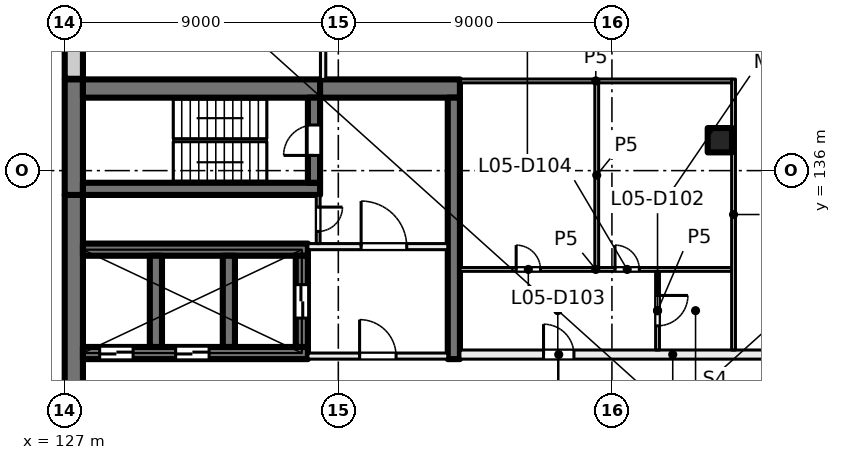
"""IFC4 building model, lengths in metres.
Left out: names, types, materials, properties, quantities, classifications, styles, units other than length and angle.
Written with IfcOpenShell. Run it as: python <this file> out.ifc"""

import sys

from ifc_helpers import new_model, si_unit, direction, frame, frame_2d, origin, origin_2d, place, context, subcontext, project, spatial, rectangle, extrude, element, fill, save


model = new_model("IFC4")
c1 = context("Model", 3, precision=1e-05, world=origin(), true_north=direction((0.0, 1.0)))
c2 = subcontext(c1, "Body", "Model", "MODEL_VIEW")
j1 = project(units=[si_unit("LENGTHUNIT", "METRE"), si_unit("PLANEANGLEUNIT", "RADIAN")], contexts=[c1])
p1 = place(None, origin())
s1 = spatial("IfcSite", under=j1, at=p1, CompositionType="ELEMENT")
p2 = place(p1, origin())
s2 = spatial("IfcBuilding", under=s1, at=p2, CompositionType="ELEMENT")
p3 = place(p2, frame((0.0, 0.0, 27.5)))
s3 = spatial("IfcBuildingStorey", under=s2, at=p3, CompositionType="ELEMENT", Elevation=27.5)
p4 = place(p3, frame((148.55, 137.0, 0.0), z_axis=(0.0, 0.0, 1.0), x_axis=(1.0, 0.0, 0.0)))
e1 = element("IfcColumn", 1, at=p4, inside=s3, PredefinedType="COLUMN", context=c2, shape_type="SweptSolid", body=[
    extrude(rectangle(XDim=0.8, YDim=0.8, at=origin_2d()), origin(), (0.0, 0.0, 1.0), 4.0),
])
p5 = place(p3, frame((127.3, 120.8, 0.0), z_axis=(0.0, 0.0, 1.0), x_axis=(0.0, 1.0, 0.0)))
e2 = element("IfcWall", 2, at=p5, inside=s3, PredefinedType="SHEAR", context=c2, shape_type="SweptSolid", body=[
    extrude(rectangle(XDim=14.4, YDim=0.6, at=frame_2d((7.2, 0.0))), origin(), (0.0, 0.0, 1.0), 4.0),
])
p6 = place(p3, frame((127.3, 135.2, 0.0), z_axis=(0.0, 0.0, 1.0), x_axis=(0.0, 1.0, 0.0)))
e3 = element("IfcWall", 3, at=p6, inside=s3, PredefinedType="SHEAR", context=c2, shape_type="SweptSolid", body=[
    extrude(rectangle(XDim=3.8, YDim=0.6, at=frame_2d((1.9, 0.0))), origin(), (0.0, 0.0, 1.0), 4.0),
])
p7 = place(p3, frame((127.6, 138.7, 0.0), z_axis=(0.0, 0.0, 1.0), x_axis=(1.0, 0.0, 0.0)))
e4 = element("IfcWall", 4, at=p7, inside=s3, PredefinedType="SHEAR", context=c2, shape_type="SweptSolid", body=[
    extrude(rectangle(XDim=7.8, YDim=0.6, at=frame_2d((3.9, 0.0))), origin(), (0.0, 0.0, 1.0), 4.0),
])
p8 = place(p3, frame((135.4, 138.7, 0.0), z_axis=(0.0, 0.0, 1.0), x_axis=(1.0, 0.0, 0.0)))
e5 = element("IfcWall", 5, at=p8, inside=s3, PredefinedType="SHEAR", context=c2, shape_type="SweptSolid", body=[
    extrude(rectangle(XDim=4.6, YDim=0.6, at=frame_2d((2.3, 0.0))), origin(), (0.0, 0.0, 1.0), 4.0),
])
p9 = place(p3, frame((127.6, 135.4, 0.0), z_axis=(0.0, 0.0, 1.0), x_axis=(1.0, 0.0, 0.0)))
e6 = element("IfcWall", 6, at=p9, inside=s3, PredefinedType="SHEAR", context=c2, shape_type="SweptSolid", body=[
    extrude(rectangle(XDim=7.8, YDim=0.4, at=frame_2d((3.9, 0.0))), origin(), (0.0, 0.0, 1.0), 4.0),
])
p10 = place(p3, frame((135.2, 135.6, 0.0), z_axis=(0.0, 0.0, 1.0), x_axis=(0.0, 1.0, 0.0)))
e7 = element("IfcWall", 7, at=p10, inside=s3, PredefinedType="SHEAR", context=c2, shape_type="SweptSolid", body=[
    extrude(rectangle(XDim=2.8, YDim=0.4, at=frame_2d((1.4, 0.0))), origin(), (0.0, 0.0, 1.0), 4.0),
])
p11 = place(p10, frame((0.9, 0.0, 0.0)))
e8 = element("IfcOpeningElement", 8, at=p11, cuts=e7, PredefinedType="OPENING", context=c2, shape_type="SweptSolid", body=[
    extrude(rectangle(XDim=1.0, YDim=2.1, at=frame_2d((0.5, 1.05))), frame((0.0, 0.21, 0.0), z_axis=(0.0, -1.0, 0.0), x_axis=(1.0, 0.0, 0.0)), (0.0, 0.0, 1.0), 0.42),
])
p12 = place(p3, frame((127.6, 130.0, 0.0), z_axis=(0.0, 0.0, 1.0), x_axis=(1.0, 0.0, 0.0)))
e9 = element("IfcWall", 9, at=p12, inside=s3, PredefinedType="SHEAR", context=c2, shape_type="SweptSolid", body=[
    extrude(rectangle(XDim=7.4, YDim=0.4, at=frame_2d((3.7, 0.0))), origin(), (0.0, 0.0, 1.0), 4.0),
])
p13 = place(p12, frame((0.55, 0.0, 0.0)))
e10 = element("IfcOpeningElement", 10, at=p13, cuts=e9, PredefinedType="OPENING", context=c2, shape_type="SweptSolid", body=[
    extrude(rectangle(XDim=1.1, YDim=2.1, at=frame_2d((0.55, 1.05))), frame((0.0, 0.21, 0.0), z_axis=(0.0, -1.0, 0.0), x_axis=(1.0, 0.0, 0.0)), (0.0, 0.0, 1.0), 0.42),
])
p14 = place(p12, frame((3.05, 0.0, 0.0)))
e11 = element("IfcOpeningElement", 11, at=p14, cuts=e9, PredefinedType="OPENING", context=c2, shape_type="SweptSolid", body=[
    extrude(rectangle(XDim=1.1, YDim=2.1, at=frame_2d((0.55, 1.05))), frame((0.0, 0.21, 0.0), z_axis=(0.0, -1.0, 0.0), x_axis=(1.0, 0.0, 0.0)), (0.0, 0.0, 1.0), 0.42),
])
p15 = place(p3, frame((127.6, 133.4, 0.0), z_axis=(0.0, 0.0, 1.0), x_axis=(1.0, 0.0, 0.0)))
e12 = element("IfcWall", 12, at=p15, inside=s3, PredefinedType="SHEAR", context=c2, shape_type="SweptSolid", body=[
    extrude(rectangle(XDim=7.4, YDim=0.4, at=frame_2d((3.7, 0.0))), origin(), (0.0, 0.0, 1.0), 4.0),
])
for number, where, z_axis, x_axis in (
    (13, (130.0, 130.2, 0.0), (0.0, 0.0, 1.0), (0.0, 1.0, 0.0)),
    (14, (132.4, 130.2, 0.0), (0.0, 0.0, 1.0), (0.0, 1.0, 0.0)),
):
    element("IfcWall", number, at=place(p3, frame(where, z_axis=z_axis, x_axis=x_axis)), inside=s3, PredefinedType="SHEAR", context=c2, shape_type="SweptSolid", body=[
        extrude(rectangle(XDim=3.0, YDim=0.4, at=frame_2d((1.5, 0.0))), origin(), (0.0, 0.0, 1.0), 4.0),
    ])
p16 = place(p3, frame((134.8, 130.2, 0.0), z_axis=(0.0, 0.0, 1.0), x_axis=(0.0, 1.0, 0.0)))
e15 = element("IfcWall", 15, at=p16, inside=s3, PredefinedType="SHEAR", context=c2, shape_type="SweptSolid", body=[
    extrude(rectangle(XDim=3.0, YDim=0.4, at=frame_2d((1.5, 0.0))), origin(), (0.0, 0.0, 1.0), 4.0),
])
p17 = place(p16, frame((0.95, 0.0, 0.0)))
e16 = element("IfcOpeningElement", 16, at=p17, cuts=e15, PredefinedType="OPENING", context=c2, shape_type="SweptSolid", body=[
    extrude(rectangle(XDim=1.1, YDim=2.1, at=frame_2d((0.55, 1.05))), frame((0.0, 0.21, 0.0), z_axis=(0.0, -1.0, 0.0), x_axis=(1.0, 0.0, 0.0)), (0.0, 0.0, 1.0), 0.42),
])
p18 = place(p3, frame((139.8, 129.8, 0.0), z_axis=(0.0, 0.0, 1.0), x_axis=(0.0, 1.0, 0.0)))
e17 = element("IfcWall", 17, at=p18, inside=s3, PredefinedType="SHEAR", context=c2, shape_type="SweptSolid", body=[
    extrude(rectangle(XDim=8.6, YDim=0.4, at=frame_2d((4.3, 0.0))), origin(), (0.0, 0.0, 1.0), 4.0),
])
p19 = place(p3, frame((127.3, 139.02, 0.0), z_axis=(0.0, 0.0, 1.0), x_axis=(0.0, 1.0, 0.0)))
e18 = element("IfcWall", 18, at=p19, inside=s3, PredefinedType="SOLIDWALL", context=c2, shape_type="SweptSolid", body=[
    extrude(rectangle(XDim=2.98, YDim=0.6, at=frame_2d((1.49, 0.0))), origin(), (0.0, 0.0, 1.0), 3.625),
])
p20 = place(p3, frame((135.0, 129.9, 0.0), z_axis=(0.0, 0.0, 1.0), x_axis=(1.0, 0.0, 0.0)))
e19 = element("IfcWall", 19, at=p20, inside=s3, PredefinedType="PARTITIONING", context=c2, shape_type="SweptSolid", body=[
    extrude(rectangle(XDim=4.6, YDim=0.2, at=frame_2d((2.3, 0.0))), origin(), (0.0, 0.0, 1.0), 3.625),
])
p21 = place(p20, frame((1.7, 0.0, 0.0)))
e20 = element("IfcOpeningElement", 20, at=p21, cuts=e19, PredefinedType="OPENING", context=c2, shape_type="SweptSolid", body=[
    extrude(rectangle(XDim=1.2, YDim=2.1, at=frame_2d((0.6, 1.05))), frame((0.0, 0.11, 0.0), z_axis=(0.0, -1.0, 0.0), x_axis=(1.0, 0.0, 0.0)), (0.0, 0.0, 1.0), 0.22),
])
p22 = place(p3, frame((135.0, 133.5, 0.0), z_axis=(0.0, 0.0, 1.0), x_axis=(1.0, 0.0, 0.0)))
e21 = element("IfcWall", 21, at=p22, inside=s3, PredefinedType="PARTITIONING", context=c2, shape_type="SweptSolid", body=[
    extrude(rectangle(XDim=4.6, YDim=0.2, at=frame_2d((2.3, 0.0))), origin(), (0.0, 0.0, 1.0), 3.625),
])
p23 = place(p22, frame((1.75, 0.0, 0.0)))
e22 = element("IfcOpeningElement", 22, at=p23, cuts=e21, PredefinedType="OPENING", context=c2, shape_type="SweptSolid", body=[
    extrude(rectangle(XDim=1.5, YDim=2.1, at=frame_2d((0.75, 1.05))), frame((0.0, 0.11, 0.0), z_axis=(0.0, -1.0, 0.0), x_axis=(1.0, 0.0, 0.0)), (0.0, 0.0, 1.0), 0.22),
])
p24 = place(p3, frame((135.337, 135.2, 0.0), z_axis=(0.0, 0.0, 1.0), x_axis=(0.0, -1.0, 0.0)))
e23 = element("IfcWall", 23, at=p24, inside=s3, PredefinedType="PARTITIONING", context=c2, shape_type="SweptSolid", body=[
    extrude(rectangle(XDim=1.6, YDim=0.125, at=frame_2d((0.8, 0.0))), origin(), (0.0, 0.0, 1.0), 3.625),
])
p25 = place(p24, frame((0.4, 0.0, 0.0)))
e24 = element("IfcOpeningElement", 24, at=p25, cuts=e23, PredefinedType="OPENING", context=c2, shape_type="SweptSolid", body=[
    extrude(rectangle(XDim=0.8, YDim=2.1, at=frame_2d((0.4, 1.05))), frame((0.0, 0.073, 0.0), z_axis=(0.0, -1.0, 0.0), x_axis=(1.0, 0.0, 0.0)), (0.0, 0.0, 1.0), 0.145),
])
p26 = place(p3, frame((135.5, 145.4, 0.0), z_axis=(0.0, 0.0, 1.0), x_axis=(0.0, -1.0, 0.0)))
e25 = element("IfcWall", 25, at=p26, inside=s3, PredefinedType="PARTITIONING", context=c2, shape_type="SweptSolid", body=[
    extrude(rectangle(XDim=6.4, YDim=0.175, at=frame_2d((3.2, 0.0))), origin(), (0.0, 0.0, 1.0), 3.625),
])
p27 = place(p26, frame((2.6, 0.0, 0.0)))
e26 = element("IfcOpeningElement", 26, at=p27, cuts=e25, PredefinedType="OPENING", context=c2, shape_type="SweptSolid", body=[
    extrude(rectangle(XDim=1.2, YDim=2.1, at=frame_2d((0.6, 1.05))), frame((0.0, 0.097, 0.0), z_axis=(0.0, -1.0, 0.0), x_axis=(1.0, 0.0, 0.0)), (0.0, 0.0, 1.0), 0.195),
])
p28 = place(p3, frame((140.0, 129.95, 0.0), z_axis=(0.0, 0.0, 1.0), x_axis=(1.0, 0.0, 0.0)))
e27 = element("IfcWall", 27, at=p28, inside=s3, PredefinedType="PARTITIONING", context=c2, shape_type="SweptSolid", body=[
    extrude(rectangle(XDim=14.0, YDim=0.3, at=frame_2d((7.0, 0.0))), origin(), (0.0, 0.0, 1.0), 3.625),
])
p29 = place(p28, frame((2.75, 0.0, 0.0)))
e28 = element("IfcOpeningElement", 28, at=p29, cuts=e27, PredefinedType="OPENING", context=c2, shape_type="SweptSolid", body=[
    extrude(rectangle(XDim=1.0, YDim=2.1, at=frame_2d((0.5, 1.05))), frame((0.0, 0.16, 0.0), z_axis=(0.0, -1.0, 0.0), x_axis=(1.0, 0.0, 0.0)), (0.0, 0.0, 1.0), 0.32),
])
p30 = place(p28, frame((10.6, 0.0, 0.0)))
e29 = element("IfcOpeningElement", 29, at=p30, cuts=e27, PredefinedType="OPENING", context=c2, shape_type="SweptSolid", body=[
    extrude(rectangle(XDim=1.8, YDim=2.1, at=frame_2d((0.9, 1.05))), frame((0.0, 0.16, 0.0), z_axis=(0.0, -1.0, 0.0), x_axis=(1.0, 0.0, 0.0)), (0.0, 0.0, 1.0), 0.32),
])
p31 = place(p3, frame((140.0, 132.75, 0.0), z_axis=(0.0, 0.0, 1.0), x_axis=(1.0, 0.0, 0.0)))
e30 = element("IfcWall", 30, at=p31, inside=s3, PredefinedType="PARTITIONING", context=c2, shape_type="SweptSolid", body=[
    extrude(rectangle(XDim=8.938, YDim=0.125, at=frame_2d((4.469, 0.0))), origin(), (0.0, 0.0, 1.0), 3.625),
])
p32 = place(p31, frame((1.85, 0.0, 0.0)))
e31 = element("IfcOpeningElement", 31, at=p32, cuts=e30, PredefinedType="OPENING", context=c2, shape_type="SweptSolid", body=[
    extrude(rectangle(XDim=0.8, YDim=2.1, at=frame_2d((0.4, 1.05))), frame((0.0, 0.073, 0.0), z_axis=(0.0, -1.0, 0.0), x_axis=(1.0, 0.0, 0.0)), (0.0, 0.0, 1.0), 0.145),
])
p33 = place(p31, frame((5.102, 0.0, 0.0)))
e32 = element("IfcOpeningElement", 32, at=p33, cuts=e30, PredefinedType="OPENING", context=c2, shape_type="SweptSolid", body=[
    extrude(rectangle(XDim=0.8, YDim=2.1, at=frame_2d((0.4, 1.05))), frame((0.0, 0.073, 0.0), z_axis=(0.0, -1.0, 0.0), x_axis=(1.0, 0.0, 0.0)), (0.0, 0.0, 1.0), 0.145),
])
p34 = place(p3, frame((140.0, 138.95, 0.0), z_axis=(0.0, 0.0, 1.0), x_axis=(1.0, 0.0, 0.0)))
e33 = element("IfcWall", 33, at=p34, inside=s3, PredefinedType="PARTITIONING", context=c2, shape_type="SweptSolid", body=[
    extrude(rectangle(XDim=8.938, YDim=0.125, at=frame_2d((4.469, 0.0))), origin(), (0.0, 0.0, 1.0), 3.625),
])
p35 = place(p3, frame((144.5, 132.812, 0.0), z_axis=(0.0, 0.0, 1.0), x_axis=(0.0, 1.0, 0.0)))
e34 = element("IfcWall", 34, at=p35, inside=s3, PredefinedType="PARTITIONING", context=c2, shape_type="SweptSolid", body=[
    extrude(rectangle(XDim=6.076, YDim=0.125, at=frame_2d((3.038, 0.0))), origin(), (0.0, 0.0, 1.0), 3.625),
])
p36 = place(p3, frame((146.5, 132.688, 0.0), z_axis=(0.0, 0.0, 1.0), x_axis=(0.0, -1.0, 0.0)))
e35 = element("IfcWall", 35, at=p36, inside=s3, PredefinedType="PARTITIONING", context=c2, shape_type="SweptSolid", body=[
    extrude(rectangle(XDim=2.588, YDim=0.125, at=frame_2d((1.294, 0.0))), origin(), (0.0, 0.0, 1.0), 3.625),
])
p37 = place(p36, frame((0.794, 0.0, 0.0)))
e36 = element("IfcOpeningElement", 36, at=p37, cuts=e35, PredefinedType="OPENING", context=c2, shape_type="SweptSolid", body=[
    extrude(rectangle(XDim=1.0, YDim=2.1, at=frame_2d((0.5, 1.05))), frame((0.0, 0.073, 0.0), z_axis=(0.0, -1.0, 0.0), x_axis=(1.0, 0.0, 0.0)), (0.0, 0.0, 1.0), 0.145),
])
p38 = place(p3, frame((149.0, 139.012, 0.0), z_axis=(0.0, 0.0, 1.0), x_axis=(0.0, -1.0, 0.0)))
e37 = element("IfcWall", 37, at=p38, inside=s3, PredefinedType="PARTITIONING", context=c2, shape_type="SweptSolid", body=[
    extrude(rectangle(XDim=8.912, YDim=0.125, at=frame_2d((4.456, 0.0))), origin(), (0.0, 0.0, 1.0), 3.625),
])
p39 = place(p13, origin())
e38 = element("IfcDoor", 38, at=p39, inside=s3, OperationType="DOUBLE_DOOR_SLIDING", PredefinedType="DOOR", context=c2, shape_type="SweptSolid", body=[
    extrude(rectangle(XDim=1.1, YDim=2.1, at=frame_2d((0.55, 1.05))), frame((0.0, 0.025, 0.0), z_axis=(0.0, -1.0, 0.0), x_axis=(1.0, 0.0, 0.0)), (0.0, 0.0, 1.0), 0.05),
])
fill(e10, e38)
p40 = place(p14, origin())
e39 = element("IfcDoor", 39, at=p40, inside=s3, OperationType="DOUBLE_DOOR_SLIDING", PredefinedType="DOOR", context=c2, shape_type="SweptSolid", body=[
    extrude(rectangle(XDim=1.1, YDim=2.1, at=frame_2d((0.55, 1.05))), frame((0.0, 0.025, 0.0), z_axis=(0.0, -1.0, 0.0), x_axis=(1.0, 0.0, 0.0)), (0.0, 0.0, 1.0), 0.05),
])
fill(e11, e39)
p41 = place(p21, origin())
e40 = element("IfcDoor", 40, at=p41, inside=s3, OperationType="DOUBLE_DOOR_SINGLE_SWING", PredefinedType="DOOR", context=c2, shape_type="SweptSolid", body=[
    extrude(rectangle(XDim=1.2, YDim=2.1, at=frame_2d((0.6, 1.05))), frame((0.0, 0.025, 0.0), z_axis=(0.0, -1.0, 0.0), x_axis=(1.0, 0.0, 0.0)), (0.0, 0.0, 1.0), 0.05),
])
fill(e20, e40)
p42 = place(p23, origin())
e41 = element("IfcDoor", 41, at=p42, inside=s3, OperationType="DOUBLE_DOOR_SINGLE_SWING", PredefinedType="DOOR", context=c2, shape_type="SweptSolid", body=[
    extrude(rectangle(XDim=1.5, YDim=2.1, at=frame_2d((0.75, 1.05))), frame((0.0, 0.025, 0.0), z_axis=(0.0, -1.0, 0.0), x_axis=(1.0, 0.0, 0.0)), (0.0, 0.0, 1.0), 0.05),
])
fill(e22, e41)
p43 = place(p11, origin())
e42 = element("IfcDoor", 42, at=p43, inside=s3, OperationType="SINGLE_SWING_LEFT", PredefinedType="DOOR", context=c2, shape_type="SweptSolid", body=[
    extrude(rectangle(XDim=1.0, YDim=2.1, at=frame_2d((0.5, 1.05))), frame((0.0, 0.025, 0.0), z_axis=(0.0, -1.0, 0.0), x_axis=(1.0, 0.0, 0.0)), (0.0, 0.0, 1.0), 0.05),
])
fill(e8, e42)
p44 = place(p25, origin())
e43 = element("IfcDoor", 43, at=p44, inside=s3, OperationType="SINGLE_SWING_RIGHT", PredefinedType="DOOR", context=c2, shape_type="SweptSolid", body=[
    extrude(rectangle(XDim=0.8, YDim=2.1, at=frame_2d((0.4, 1.05))), frame((0.0, 0.025, 0.0), z_axis=(0.0, -1.0, 0.0), x_axis=(1.0, 0.0, 0.0)), (0.0, 0.0, 1.0), 0.05),
])
fill(e24, e43)
p45 = place(p17, origin())
e44 = element("IfcDoor", 44, at=p45, inside=s3, OperationType="DOUBLE_DOOR_SLIDING", PredefinedType="DOOR", context=c2, shape_type="SweptSolid", body=[
    extrude(rectangle(XDim=1.1, YDim=2.1, at=frame_2d((0.55, 1.05))), frame((0.0, 0.025, 0.0), z_axis=(0.0, -1.0, 0.0), x_axis=(1.0, 0.0, 0.0)), (0.0, 0.0, 1.0), 0.05),
])
fill(e16, e44)
p46 = place(p29, origin())
e45 = element("IfcDoor", 45, at=p46, inside=s3, OperationType="SINGLE_SWING_LEFT", PredefinedType="DOOR", context=c2, shape_type="SweptSolid", body=[
    extrude(rectangle(XDim=1.0, YDim=2.1, at=frame_2d((0.5, 1.05))), frame((0.0, 0.025, 0.0), z_axis=(0.0, -1.0, 0.0), x_axis=(1.0, 0.0, 0.0)), (0.0, 0.0, 1.0), 0.05),
])
fill(e28, e45)
p47 = place(p37, origin())
e46 = element("IfcDoor", 46, at=p47, inside=s3, OperationType="SINGLE_SWING_RIGHT", PredefinedType="DOOR", context=c2, shape_type="SweptSolid", body=[
    extrude(rectangle(XDim=1.0, YDim=2.1, at=frame_2d((0.5, 1.05))), frame((0.0, 0.025, 0.0), z_axis=(0.0, -1.0, 0.0), x_axis=(1.0, 0.0, 0.0)), (0.0, 0.0, 1.0), 0.05),
])
fill(e36, e46)
p48 = place(p32, origin())
e47 = element("IfcDoor", 47, at=p48, inside=s3, OperationType="SINGLE_SWING_LEFT", PredefinedType="DOOR", context=c2, shape_type="SweptSolid", body=[
    extrude(rectangle(XDim=0.8, YDim=2.1, at=frame_2d((0.4, 1.05))), frame((0.0, 0.025, 0.0), z_axis=(0.0, -1.0, 0.0), x_axis=(1.0, 0.0, 0.0)), (0.0, 0.0, 1.0), 0.05),
])
fill(e31, e47)
p49 = place(p33, origin())
e48 = element("IfcDoor", 48, at=p49, inside=s3, OperationType="SINGLE_SWING_LEFT", PredefinedType="DOOR", context=c2, shape_type="SweptSolid", body=[
    extrude(rectangle(XDim=0.8, YDim=2.1, at=frame_2d((0.4, 1.05))), frame((0.0, 0.025, 0.0), z_axis=(0.0, -1.0, 0.0), x_axis=(1.0, 0.0, 0.0)), (0.0, 0.0, 1.0), 0.05),
])
fill(e32, e48)
save(model, sys.argv[1])
